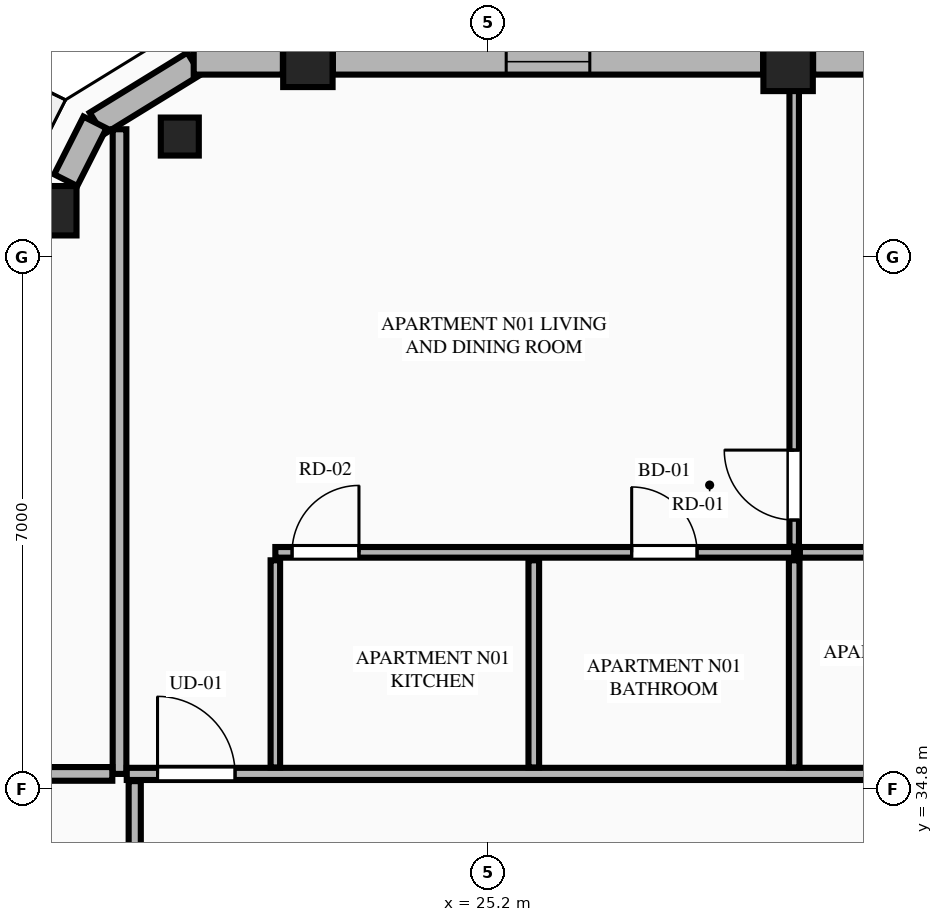
"""IFC4 building model, lengths in metres.
Left out: names, types, materials, properties, quantities, classifications, styles, units other than length and angle.
Written with IfcOpenShell. Run it as: python <this file> out.ifc"""

import sys

from ifc_helpers import new_model, si_unit, direction, frame, frame_2d, origin, origin_2d, place, context, subcontext, project, spatial, rectangle, extrude, element, fill, save


model = new_model("IFC4")
c1 = context("Model", 3, precision=1e-05, world=origin(), true_north=direction((0.0, 1.0)))
c2 = subcontext(c1, "Body", "Model", "MODEL_VIEW")
j1 = project(units=[si_unit("LENGTHUNIT", "METRE"), si_unit("PLANEANGLEUNIT", "RADIAN")], contexts=[c1])
p1 = place(None, origin())
s1 = spatial("IfcSite", under=j1, at=p1, CompositionType="ELEMENT")
p2 = place(p1, origin())
s2 = spatial("IfcBuilding", under=s1, at=p2, CompositionType="ELEMENT")
p3 = place(p2, frame((0.0, 0.0, 274.45)))
s3 = spatial("IfcBuildingStorey", under=s2, at=p3, CompositionType="ELEMENT", Elevation=274.45)
for number, where, z_axis, x_axis in (
    (1, (29.146, 44.308, 0.0), (0.0, 0.0, 1.0), (1.0, 0.0, 0.0)),
    (2, (22.828, 44.361, 0.0), (0.0, 0.0, 1.0), (1.0, 0.0, 0.0)),
    (3, (19.459, 42.409, 0.0), (0.0, 0.0, 1.0), (1.0, 0.0, 0.0)),
):
    element("IfcColumn", number, at=place(p3, frame(where, z_axis=z_axis, x_axis=x_axis)), inside=s3, PredefinedType="COLUMN", context=c2, shape_type="SweptSolid", body=[
        extrude(rectangle(XDim=0.65, YDim=0.65, at=origin_2d()), origin(), (0.0, 0.0, 1.0), 3.65),
    ])
p4 = place(p3, frame((21.143, 43.385, 0.0), z_axis=(0.0, 0.0, 1.0), x_axis=(-0.865256437757, -0.501329529272, 0.0)))
e4 = element("IfcColumn", 4, at=p4, inside=s3, PredefinedType="PILASTER", context=c2, shape_type="SweptSolid", body=[
    extrude(rectangle(XDim=0.5, YDim=0.35, at=origin_2d()), origin(), (0.0, 0.0, 1.0), 3.65),
])
p5 = place(p3, frame((21.331, 44.345, 0.0), z_axis=(0.0, 0.0, 1.0), x_axis=(-0.851680557619, -0.52406128246, 0.0)))
e5 = element("IfcWall", 5, at=p5, inside=s3, PredefinedType="STANDARD", context=c2, shape_type="SweptSolid", body=[
    extrude(rectangle(XDim=1.508, YDim=0.34, at=frame_2d((0.754, 0.0))), origin(), (0.0, 0.0, 1.0), 3.37),
])
p6 = place(p3, frame((35.325, 44.37, 0.0), z_axis=(0.0, 0.0, 1.0), x_axis=(-1.0, 0.0, 0.0)))
e6 = element("IfcWall", 6, at=p6, inside=s3, PredefinedType="STANDARD", context=c2, shape_type="SweptSolid", body=[
    extrude(rectangle(XDim=5.85, YDim=0.34, at=frame_2d((2.925, 0.0))), origin(), (0.0, 0.0, 1.0), 2.46),
])
p7 = place(p6, frame((2.375, 0.0, 0.0)))
e7 = element("IfcOpeningElement", 7, at=p7, cuts=e6, PredefinedType="OPENING", context=c2, shape_type="SweptSolid", body=[
    extrude(rectangle(XDim=1.1, YDim=2.25, at=frame_2d((0.55, 1.125))), frame((0.0, 0.18, 0.0), z_axis=(0.0, -1.0, 0.0), x_axis=(1.0, 0.0, 0.0)), (0.0, 0.0, 1.0), 0.36),
])
p8 = place(p3, frame((28.817, 44.37, 0.0), z_axis=(0.0, 0.0, 1.0), x_axis=(-1.0, 0.0, 0.0)))
e8 = element("IfcWall", 8, at=p8, inside=s3, PredefinedType="STANDARD", context=c2, shape_type="SweptSolid", body=[
    extrude(rectangle(XDim=5.66, YDim=0.34, at=frame_2d((2.83, 0.0))), origin(), (0.0, 0.0, 1.0), 2.46),
])
p9 = place(p8, frame((2.28, 0.0, 0.75)))
e9 = element("IfcOpeningElement", 9, at=p9, cuts=e8, PredefinedType="OPENING", context=c2, shape_type="SweptSolid", body=[
    extrude(rectangle(XDim=1.1, YDim=1.56, at=frame_2d((0.55, 0.78))), frame((0.0, 0.18, 0.0), z_axis=(0.0, -1.0, 0.0), x_axis=(1.0, 0.0, 0.0)), (0.0, 0.0, 1.0), 0.36),
])
p10 = place(p3, frame((22.499, 44.37, 0.0), z_axis=(0.0, 0.0, 1.0), x_axis=(-1.0, 0.0, 0.0)))
e10 = element("IfcWall", 10, at=p10, inside=s3, PredefinedType="STANDARD", context=c2, shape_type="SweptSolid", body=[
    extrude(rectangle(XDim=1.173, YDim=0.34, at=frame_2d((0.586, 0.0))), origin(), (0.0, 0.0, 1.0), 3.37),
])
p11 = place(p3, frame((20.027, 43.571, 0.0), z_axis=(0.0, 0.0, 1.0), x_axis=(-0.451907025977, -0.8920650424, 0.0)))
e11 = element("IfcWall", 11, at=p11, inside=s3, PredefinedType="STANDARD", context=c2, shape_type="SweptSolid", body=[
    extrude(rectangle(XDim=0.852, YDim=0.34, at=frame_2d((0.426, 0.0))), origin(), (0.0, 0.0, 1.0), 3.37),
])
p12 = place(p3, frame((20.35, 35.0, 0.0), z_axis=(0.0, 0.0, 1.0), x_axis=(0.0, 1.0, 0.0)))
e12 = element("IfcWall", 12, at=p12, inside=s3, PredefinedType="PARTITIONING", context=c2, shape_type="SweptSolid", body=[
    extrude(rectangle(XDim=8.481, YDim=0.18, at=frame_2d((4.24, 0.0))), origin(), (0.0, 0.0, 1.0), 3.37),
])
p13 = place(p3, frame((20.445, 35.0, 0.0), z_axis=(0.0, 0.0, 1.0), x_axis=(1.0, 0.0, 0.0)))
e13 = element("IfcWall", 13, at=p13, inside=s3, PredefinedType="PARTITIONING", context=c2, shape_type="SweptSolid", body=[
    extrude(rectangle(XDim=15.114, YDim=0.16, at=frame_2d((7.557, 0.0))), origin(), (0.0, 0.0, 1.0), 3.37),
])
p14 = place(p13, frame((0.405, 0.0, 0.0)))
e14 = element("IfcOpeningElement", 14, at=p14, cuts=e13, PredefinedType="OPENING", context=c2, shape_type="SweptSolid", body=[
    extrude(rectangle(XDim=1.02, YDim=2.25, at=frame_2d((0.51, 1.125))), frame((0.0, 0.09, 0.0), z_axis=(0.0, -1.0, 0.0), x_axis=(1.0, 0.0, 0.0)), (0.0, 0.0, 1.0), 0.18),
])
p15 = place(p3, frame((22.4, 35.085, 0.0), z_axis=(0.0, 0.0, 1.0), x_axis=(0.0, 1.0, 0.0)))
e15 = element("IfcWall", 15, at=p15, inside=s3, PredefinedType="PARTITIONING", context=c2, shape_type="SweptSolid", body=[
    extrude(rectangle(XDim=2.725, YDim=0.125, at=frame_2d((1.363, 0.0))), origin(), (0.0, 0.0, 1.0), 3.37),
])
p16 = place(p3, frame((22.4, 37.915, 0.0), z_axis=(0.0, 0.0, 1.0), x_axis=(1.0, 0.0, 0.0)))
e16 = element("IfcWall", 16, at=p16, inside=s3, PredefinedType="PLUMBINGWALL", context=c2, shape_type="SweptSolid", body=[
    extrude(rectangle(XDim=6.826, YDim=0.14, at=frame_2d((3.413, 0.0))), origin(), (0.0, 0.0, 1.0), 3.37),
])
p17 = place(p16, frame((4.688, 0.0, 0.0)))
e17 = element("IfcOpeningElement", 17, at=p17, cuts=e16, PredefinedType="OPENING", context=c2, shape_type="SweptSolid", body=[
    extrude(rectangle(XDim=0.86, YDim=2.1, at=frame_2d((0.43, 1.05))), frame((0.0, 0.08, 0.0), z_axis=(0.0, -1.0, 0.0), x_axis=(1.0, 0.0, 0.0)), (0.0, 0.0, 1.0), 0.16),
])
p18 = place(p16, frame((0.22, 0.0, 0.0)))
e18 = element("IfcOpeningElement", 18, at=p18, cuts=e16, PredefinedType="OPENING", context=c2, shape_type="SweptSolid", body=[
    extrude(rectangle(XDim=0.88, YDim=2.15, at=frame_2d((0.44, 1.075))), frame((0.0, 0.08, 0.0), z_axis=(0.0, -1.0, 0.0), x_axis=(1.0, 0.0, 0.0)), (0.0, 0.0, 1.0), 0.16),
])
p19 = place(p3, frame((29.301, 37.915, 0.0), z_axis=(0.0, 0.0, 1.0), x_axis=(1.0, 0.0, 0.0)))
e19 = element("IfcWall", 19, at=p19, inside=s3, PredefinedType="PLUMBINGWALL", context=c2, shape_type="SweptSolid", body=[
    extrude(rectangle(XDim=6.258, YDim=0.14, at=frame_2d((3.129, 0.0))), origin(), (0.0, 0.0, 1.0), 3.37),
])
p20 = place(p19, frame((2.704, 0.0, 0.0)))
e20 = element("IfcOpeningElement", 20, at=p20, cuts=e19, PredefinedType="OPENING", context=c2, shape_type="SweptSolid", body=[
    extrude(rectangle(XDim=0.86, YDim=2.1, at=frame_2d((0.43, 1.05))), frame((0.0, 0.08, 0.0), z_axis=(0.0, -1.0, 0.0), x_axis=(1.0, 0.0, 0.0)), (0.0, 0.0, 1.0), 0.16),
])
p21 = place(p3, frame((25.8, 35.085, 0.0), z_axis=(0.0, 0.0, 1.0), x_axis=(0.0, 1.0, 0.0)))
e21 = element("IfcWall", 21, at=p21, inside=s3, PredefinedType="PLUMBINGWALL", context=c2, shape_type="SweptSolid", body=[
    extrude(rectangle(XDim=2.725, YDim=0.14, at=frame_2d((1.363, 0.0))), origin(), (0.0, 0.0, 1.0), 3.37),
])
p22 = place(p3, frame((29.226, 35.085, 0.0), z_axis=(0.0, 0.0, 1.0), x_axis=(0.0, 1.0, 0.0)))
e22 = element("IfcWall", 22, at=p22, inside=s3, PredefinedType="PLUMBINGWALL", context=c2, shape_type="SweptSolid", body=[
    extrude(rectangle(XDim=2.725, YDim=0.14, at=frame_2d((1.363, 0.0))), origin(), (0.0, 0.0, 1.0), 2.677),
])
p23 = place(p3, frame((29.226, 37.99, 0.0), z_axis=(0.0, 0.0, 1.0), x_axis=(0.0, 1.0, 0.0)))
e23 = element("IfcWall", 23, at=p23, inside=s3, PredefinedType="PARTITIONING", context=c2, shape_type="SweptSolid", body=[
    extrude(rectangle(XDim=6.295, YDim=0.125, at=frame_2d((3.147, 0.0))), origin(), (0.0, 0.0, 1.0), 2.677),
])
p24 = place(p23, frame((0.35, 0.0, 0.0)))
e24 = element("IfcOpeningElement", 24, at=p24, cuts=e23, PredefinedType="OPENING", context=c2, shape_type="SweptSolid", body=[
    extrude(rectangle(XDim=0.92, YDim=2.15, at=frame_2d((0.46, 1.075))), frame((0.0, 0.073, 0.0), z_axis=(0.0, -1.0, 0.0), x_axis=(1.0, 0.0, 0.0)), (0.0, 0.0, 1.0), 0.145),
])
p25 = place(p3, frame((15.933, 35.0, 0.0), z_axis=(0.0, 0.0, 1.0), x_axis=(1.0, 0.0, 0.0)))
e25 = element("IfcWall", 25, at=p25, inside=s3, PredefinedType="PARTITIONING", context=c2, shape_type="SweptSolid", body=[
    extrude(rectangle(XDim=4.322, YDim=0.18, at=frame_2d((2.161, 0.0))), origin(), (0.0, 0.0, 1.0), 3.37),
])
p26 = place(p3, frame((20.55, 16.495, 0.0), z_axis=(0.0, 0.0, 1.0), x_axis=(0.0, 1.0, 0.0)))
e26 = element("IfcWall", 26, at=p26, inside=s3, PredefinedType="PARTITIONING", context=c2, shape_type="SweptSolid", body=[
    extrude(rectangle(XDim=18.41, YDim=0.16, at=frame_2d((9.205, 0.0))), origin(), (0.0, 0.0, 1.0), 3.057),
])
p27 = place(p26, frame((0.45, 0.0, 0.0)))
e27 = element("IfcOpeningElement", 27, at=p27, cuts=e26, PredefinedType="OPENING", context=c2, shape_type="SweptSolid", body=[
    extrude(rectangle(XDim=1.02, YDim=2.25, at=frame_2d((0.51, 1.125))), frame((0.0, 0.09, 0.0), z_axis=(0.0, -1.0, 0.0), x_axis=(1.0, 0.0, 0.0)), (0.0, 0.0, 1.0), 0.18),
])
p28 = place(p9, origin())
e28 = element("IfcWindow", 28, at=p28, inside=s3, PartitioningType="SINGLE_PANEL", PredefinedType="WINDOW", context=c2, shape_type="SweptSolid", body=[
    extrude(rectangle(XDim=1.1, YDim=1.56, at=frame_2d((0.55, 0.78))), frame((0.0, 0.03, 0.0), z_axis=(0.0, -1.0, 0.0), x_axis=(1.0, 0.0, 0.0)), (0.0, 0.0, 1.0), 0.06),
])
fill(e9, e28)
p29 = place(p17, origin())
e29 = element("IfcDoor", 29, at=p29, inside=s3, OperationType="SINGLE_SWING_LEFT", PredefinedType="DOOR", context=c2, shape_type="SweptSolid", body=[
    extrude(rectangle(XDim=0.86, YDim=2.1, at=frame_2d((0.43, 1.05))), frame((0.0, 0.025, 0.0), z_axis=(0.0, -1.0, 0.0), x_axis=(1.0, 0.0, 0.0)), (0.0, 0.0, 1.0), 0.05),
])
fill(e17, e29)
p30 = place(p14, origin())
e30 = element("IfcDoor", 30, at=p30, inside=s3, OperationType="SINGLE_SWING_LEFT", PredefinedType="DOOR", context=c2, shape_type="SweptSolid", body=[
    extrude(rectangle(XDim=1.02, YDim=2.25, at=frame_2d((0.51, 1.125))), frame((0.0, 0.025, 0.0), z_axis=(0.0, -1.0, 0.0), x_axis=(1.0, 0.0, 0.0)), (0.0, 0.0, 1.0), 0.05),
])
fill(e14, e30)
p31 = place(p18, origin())
e31 = element("IfcDoor", 31, at=p31, inside=s3, OperationType="SINGLE_SWING_RIGHT", PredefinedType="DOOR", context=c2, shape_type="SweptSolid", body=[
    extrude(rectangle(XDim=0.88, YDim=2.15, at=frame_2d((0.44, 1.075))), frame((0.0, 0.025, 0.0), z_axis=(0.0, -1.0, 0.0), x_axis=(1.0, 0.0, 0.0)), (0.0, 0.0, 1.0), 0.05),
])
fill(e18, e31)
p32 = place(p24, origin())
e32 = element("IfcDoor", 32, at=p32, inside=s3, OperationType="SINGLE_SWING_RIGHT", PredefinedType="DOOR", context=c2, shape_type="SweptSolid", body=[
    extrude(rectangle(XDim=0.92, YDim=2.15, at=frame_2d((0.46, 1.075))), frame((0.0, 0.025, 0.0), z_axis=(0.0, -1.0, 0.0), x_axis=(1.0, 0.0, 0.0)), (0.0, 0.0, 1.0), 0.05),
])
fill(e24, e32)
save(model, sys.argv[1])
